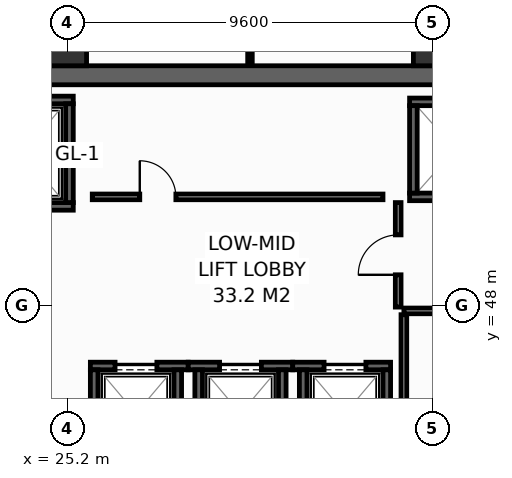
"""IFC4 building model, lengths in metres.
Left out: names, types, materials, properties, quantities, classifications, styles, units other than length and angle.
Written with IfcOpenShell. Run it as: python <this file> out.ifc"""

import sys

from ifc_helpers import new_model, si_unit, direction, frame, frame_2d, origin, origin_2d, place, context, subcontext, project, spatial, rectangle, hollow_rectangle, extrude, element, fill, save


model = new_model("IFC4")
c1 = context("Model", 3, precision=1e-05, world=origin(), true_north=direction((0.0, 1.0)))
c2 = subcontext(c1, "Body", "Model", "MODEL_VIEW")
j1 = project(units=[si_unit("LENGTHUNIT", "METRE"), si_unit("PLANEANGLEUNIT", "RADIAN")], contexts=[c1])
p1 = place(None, origin())
s1 = spatial("IfcSite", under=j1, at=p1, CompositionType="ELEMENT")
p2 = place(p1, origin())
s2 = spatial("IfcBuilding", under=s1, at=p2, CompositionType="ELEMENT")
p3 = place(p2, frame((0.0, 0.0, 156.2)))
s3 = spatial("IfcBuildingStorey", under=s2, at=p3, CompositionType="ELEMENT", Elevation=156.2)
p4 = place(p3, frame((13.6, 54.05, 0.0), z_axis=(0.0, 0.0, 1.0), x_axis=(1.0, 0.0, 0.0)))
e1 = element("IfcWall", 1, at=p4, inside=s3, PredefinedType="SHEAR", context=c2, shape_type="SweptSolid", body=[
    extrude(rectangle(XDim=32.7, YDim=0.5, at=frame_2d((16.35, 0.0))), origin(), (0.0, 0.0, 1.0), 3.55),
])
for number, where, z_axis, x_axis in (
    (2, (25.2, 54.8, 0.0), (0.0, 0.0, 1.0), (1.0, 0.0, 0.0)),
    (3, (34.8, 54.8, 0.0), (0.0, 0.0, 1.0), (1.0, 0.0, 0.0)),
):
    element("IfcColumn", number, at=place(p3, frame(where, z_axis=z_axis, x_axis=x_axis)), inside=s3, PredefinedType="COLUMN", context=c2, shape_type="SweptSolid", body=[
        extrude(hollow_rectangle(XDim=1.0, YDim=1.0, WallThickness=0.045, at=origin_2d()), origin(), (0.0, 0.0, 1.0), 3.8),
    ])
p5 = place(p3, frame((22.5, 50.6, 0.0), z_axis=(0.0, 0.0, 1.0), x_axis=(1.0, 0.0, 0.0)))
e4 = element("IfcWall", 4, at=p5, inside=s3, PredefinedType="SHEAR", context=c2, shape_type="SweptSolid", body=[
    extrude(rectangle(XDim=2.85, YDim=0.2, at=frame_2d((1.425, 0.0))), origin(), (0.0, 0.0, 1.0), 3.55),
])
p6 = place(p5, frame((0.925, 0.0, 0.0)))
e5 = element("IfcOpeningElement", 5, at=p6, cuts=e4, PredefinedType="OPENING", context=c2, shape_type="SweptSolid", body=[
    extrude(rectangle(XDim=1.25, YDim=2.3, at=frame_2d((0.625, 1.15))), frame((0.0, 0.11, 0.0), z_axis=(0.0, -1.0, 0.0), x_axis=(1.0, 0.0, 0.0)), (0.0, 0.0, 1.0), 0.22),
])
p7 = place(p3, frame((22.5, 53.4, 0.0), z_axis=(0.0, 0.0, 1.0), x_axis=(1.0, 0.0, 0.0)))
e6 = element("IfcWall", 6, at=p7, inside=s3, PredefinedType="SHEAR", context=c2, shape_type="SweptSolid", body=[
    extrude(rectangle(XDim=2.85, YDim=0.2, at=frame_2d((1.425, 0.0))), origin(), (0.0, 0.0, 1.0), 3.55),
])
p8 = place(p3, frame((25.25, 50.7, 0.0), z_axis=(0.0, 0.0, 1.0), x_axis=(0.0, 1.0, 0.0)))
e7 = element("IfcWall", 7, at=p8, inside=s3, PredefinedType="SHEAR", context=c2, shape_type="SweptSolid", body=[
    extrude(rectangle(XDim=2.6, YDim=0.2, at=frame_2d((1.3, 0.0))), origin(), (0.0, 0.0, 1.0), 3.55),
])
p9 = place(p3, frame((25.8, 46.4, 0.0), z_axis=(0.0, 0.0, 1.0), x_axis=(1.0, 0.0, 0.0)))
e8 = element("IfcWall", 8, at=p9, inside=s3, PredefinedType="SHEAR", context=c2, shape_type="SweptSolid", body=[
    extrude(rectangle(XDim=2.575, YDim=0.2, at=frame_2d((1.288, 0.0))), origin(), (0.0, 0.0, 1.0), 3.55),
])
p10 = place(p9, frame((0.65, 0.0, 0.0)))
e9 = element("IfcOpeningElement", 9, at=p10, cuts=e8, PredefinedType="OPENING", context=c2, shape_type="SweptSolid", body=[
    extrude(rectangle(XDim=1.1, YDim=2.2, at=frame_2d((0.55, 1.1))), frame((0.0, 0.11, 0.0), z_axis=(0.0, -1.0, 0.0), x_axis=(1.0, 0.0, 0.0)), (0.0, 0.0, 1.0), 0.22),
])
for number, where, z_axis, x_axis in (
    (10, (25.9, 44.0, 0.0), (0.0, 0.0, 1.0), (0.0, 1.0, 0.0)),
    (11, (28.1, 44.0, 0.0), (0.0, 0.0, 1.0), (0.0, 1.0, 0.0)),
):
    element("IfcWall", number, at=place(p3, frame(where, z_axis=z_axis, x_axis=x_axis)), inside=s3, PredefinedType="SHEAR", context=c2, shape_type="SweptSolid", body=[
        extrude(rectangle(XDim=2.3, YDim=0.2, at=frame_2d((1.15, 0.0))), origin(), (0.0, 0.0, 1.0), 3.55),
    ])
p11 = place(p3, frame((28.375, 46.4, 0.0), z_axis=(0.0, 0.0, 1.0), x_axis=(1.0, 0.0, 0.0)))
e12 = element("IfcWall", 12, at=p11, inside=s3, PredefinedType="SHEAR", context=c2, shape_type="SweptSolid", body=[
    extrude(rectangle(XDim=2.75, YDim=0.2, at=frame_2d((1.375, 0.0))), origin(), (0.0, 0.0, 1.0), 3.55),
])
p12 = place(p11, frame((0.825, 0.0, 0.0)))
e13 = element("IfcOpeningElement", 13, at=p12, cuts=e12, PredefinedType="OPENING", context=c2, shape_type="SweptSolid", body=[
    extrude(rectangle(XDim=1.1, YDim=2.2, at=frame_2d((0.55, 1.1))), frame((0.0, 0.11, 0.0), z_axis=(0.0, -1.0, 0.0), x_axis=(1.0, 0.0, 0.0)), (0.0, 0.0, 1.0), 0.22),
])
for number, where, z_axis, x_axis in (
    (14, (28.65, 44.0, 0.0), (0.0, 0.0, 1.0), (0.0, 1.0, 0.0)),
    (15, (30.85, 44.0, 0.0), (0.0, 0.0, 1.0), (0.0, 1.0, 0.0)),
):
    element("IfcWall", number, at=place(p3, frame(where, z_axis=z_axis, x_axis=x_axis)), inside=s3, PredefinedType="SHEAR", context=c2, shape_type="SweptSolid", body=[
        extrude(rectangle(XDim=2.3, YDim=0.2, at=frame_2d((1.15, 0.0))), origin(), (0.0, 0.0, 1.0), 3.55),
    ])
p13 = place(p3, frame((31.125, 46.4, 0.0), z_axis=(0.0, 0.0, 1.0), x_axis=(1.0, 0.0, 0.0)))
e16 = element("IfcWall", 16, at=p13, inside=s3, PredefinedType="SHEAR", context=c2, shape_type="SweptSolid", body=[
    extrude(rectangle(XDim=2.575, YDim=0.2, at=frame_2d((1.288, 0.0))), origin(), (0.0, 0.0, 1.0), 3.55),
])
p14 = place(p13, frame((0.825, 0.0, 0.0)))
e17 = element("IfcOpeningElement", 17, at=p14, cuts=e16, PredefinedType="OPENING", context=c2, shape_type="SweptSolid", body=[
    extrude(rectangle(XDim=1.1, YDim=2.2, at=frame_2d((0.55, 1.1))), frame((0.0, 0.11, 0.0), z_axis=(0.0, -1.0, 0.0), x_axis=(1.0, 0.0, 0.0)), (0.0, 0.0, 1.0), 0.22),
])
for number, where, z_axis, x_axis in (
    (18, (31.4, 44.0, 0.0), (0.0, 0.0, 1.0), (0.0, 1.0, 0.0)),
    (19, (33.6, 44.0, 0.0), (0.0, 0.0, 1.0), (0.0, 1.0, 0.0)),
):
    element("IfcWall", number, at=place(p3, frame(where, z_axis=z_axis, x_axis=x_axis)), inside=s3, PredefinedType="SHEAR", context=c2, shape_type="SweptSolid", body=[
        extrude(rectangle(XDim=2.3, YDim=0.2, at=frame_2d((1.15, 0.0))), origin(), (0.0, 0.0, 1.0), 3.55),
    ])
for number, where, z_axis, x_axis in (
    (20, (34.2, 50.85, 0.0), (0.0, 0.0, 1.0), (1.0, 0.0, 0.0)),
    (21, (34.2, 53.35, 0.0), (0.0, 0.0, 1.0), (1.0, 0.0, 0.0)),
):
    element("IfcWall", number, at=place(p3, frame(where, z_axis=z_axis, x_axis=x_axis)), inside=s3, PredefinedType="SHEAR", context=c2, shape_type="SweptSolid", body=[
        extrude(rectangle(XDim=2.575, YDim=0.2, at=frame_2d((1.288, 0.0))), origin(), (0.0, 0.0, 1.0), 3.55),
    ])
p15 = place(p3, frame((34.3, 50.95, 0.0), z_axis=(0.0, 0.0, 1.0), x_axis=(0.0, 1.0, 0.0)))
e22 = element("IfcWall", 22, at=p15, inside=s3, PredefinedType="SHEAR", context=c2, shape_type="SweptSolid", body=[
    extrude(rectangle(XDim=2.3, YDim=0.2, at=frame_2d((1.15, 0.0))), origin(), (0.0, 0.0, 1.0), 3.55),
])
p16 = place(p3, frame((33.9, 47.95, 0.0), z_axis=(0.0, 0.0, 1.0), x_axis=(0.0, 1.0, 0.0)))
e23 = element("IfcWall", 23, at=p16, inside=s3, PredefinedType="PARTITIONING", context=c2, shape_type="SweptSolid", body=[
    extrude(rectangle(XDim=2.75, YDim=0.15, at=frame_2d((1.375, 0.0))), origin(), (0.0, 0.0, 1.0), 3.55),
])
p17 = place(p16, frame((0.85, 0.0, 0.0)))
e24 = element("IfcOpeningElement", 24, at=p17, cuts=e23, PredefinedType="OPENING", context=c2, shape_type="SweptSolid", body=[
    extrude(rectangle(XDim=1.05, YDim=2.15, at=frame_2d((0.525, 1.075))), frame((0.0, 0.085, 0.0), z_axis=(0.0, -1.0, 0.0), x_axis=(1.0, 0.0, 0.0)), (0.0, 0.0, 1.0), 0.17),
])
p18 = place(p3, frame((34.05, 47.85, 0.0), z_axis=(0.0, 0.0, 1.0), x_axis=(1.0, 0.0, 0.0)))
e25 = element("IfcWall", 25, at=p18, inside=s3, PredefinedType="PARTITIONING", context=c2, shape_type="SweptSolid", body=[
    extrude(rectangle(XDim=8.45, YDim=0.15, at=frame_2d((4.225, 0.0))), origin(), (0.0, 0.0, 1.0), 3.55),
])
p19 = place(p3, frame((34.05, 45.22, 0.0), z_axis=(0.0, 0.0, 1.0), x_axis=(0.0, 1.0, 0.0)))
e26 = element("IfcWall", 26, at=p19, inside=s3, PredefinedType="PARTITIONING", context=c2, shape_type="SweptSolid", body=[
    extrude(rectangle(XDim=2.53, YDim=0.15, at=frame_2d((1.265, 0.0))), origin(), (0.0, 0.0, 1.0), 3.55),
])
p20 = place(p3, frame((25.85, 50.85, 0.0), z_axis=(0.0, 0.0, 1.0), x_axis=(1.0, 0.0, 0.0)))
e27 = element("IfcWall", 27, at=p20, inside=s3, PredefinedType="PARTITIONING", context=c2, shape_type="SweptSolid", body=[
    extrude(rectangle(XDim=7.65, YDim=0.15, at=frame_2d((3.825, 0.0))), origin(), (0.0, 0.0, 1.0), 3.55),
])
p21 = place(p20, frame((1.25, 0.0, 0.0)))
e28 = element("IfcOpeningElement", 28, at=p21, cuts=e27, PredefinedType="OPENING", context=c2, shape_type="SweptSolid", body=[
    extrude(rectangle(XDim=0.95, YDim=2.15, at=frame_2d((0.475, 1.075))), frame((0.0, 0.085, 0.0), z_axis=(0.0, -1.0, 0.0), x_axis=(1.0, 0.0, 0.0)), (0.0, 0.0, 1.0), 0.17),
])
p22 = place(p3, frame((30.0, 54.32, 0.0), z_axis=(0.0, 0.0, 1.0), x_axis=(0.0, 1.0, 0.0)))
e29 = element("IfcWall", 29, at=p22, inside=s3, PredefinedType="PARTITIONING", context=c2, shape_type="SweptSolid", body=[
    extrude(rectangle(XDim=1.675, YDim=0.12, at=frame_2d((0.837, 0.0))), origin(), (0.0, 0.0, 1.0), 2.935),
])
p23 = place(p10, origin())
e30 = element("IfcDoor", 30, at=p23, inside=s3, OperationType="SLIDING_TO_LEFT", PredefinedType="DOOR", context=c2, shape_type="SweptSolid", body=[
    extrude(rectangle(XDim=1.1, YDim=2.2, at=frame_2d((0.55, 1.1))), frame((0.0, 0.025, 0.0), z_axis=(0.0, -1.0, 0.0), x_axis=(1.0, 0.0, 0.0)), (0.0, 0.0, 1.0), 0.05),
])
fill(e9, e30)
p24 = place(p12, origin())
e31 = element("IfcDoor", 31, at=p24, inside=s3, OperationType="SLIDING_TO_LEFT", PredefinedType="DOOR", context=c2, shape_type="SweptSolid", body=[
    extrude(rectangle(XDim=1.1, YDim=2.2, at=frame_2d((0.55, 1.1))), frame((0.0, 0.025, 0.0), z_axis=(0.0, -1.0, 0.0), x_axis=(1.0, 0.0, 0.0)), (0.0, 0.0, 1.0), 0.05),
])
fill(e13, e31)
p25 = place(p14, origin())
e32 = element("IfcDoor", 32, at=p25, inside=s3, OperationType="SLIDING_TO_LEFT", PredefinedType="DOOR", context=c2, shape_type="SweptSolid", body=[
    extrude(rectangle(XDim=1.1, YDim=2.2, at=frame_2d((0.55, 1.1))), frame((0.0, 0.025, 0.0), z_axis=(0.0, -1.0, 0.0), x_axis=(1.0, 0.0, 0.0)), (0.0, 0.0, 1.0), 0.05),
])
fill(e17, e32)
p26 = place(p17, origin())
e33 = element("IfcDoor", 33, at=p26, inside=s3, OperationType="SINGLE_SWING_LEFT", PredefinedType="DOOR", context=c2, shape_type="SweptSolid", body=[
    extrude(rectangle(XDim=1.05, YDim=2.15, at=frame_2d((0.525, 1.075))), frame((0.0, 0.025, 0.0), z_axis=(0.0, -1.0, 0.0), x_axis=(1.0, 0.0, 0.0)), (0.0, 0.0, 1.0), 0.05),
])
fill(e24, e33)
p27 = place(p21, origin())
e34 = element("IfcDoor", 34, at=p27, inside=s3, OperationType="SINGLE_SWING_LEFT", PredefinedType="DOOR", context=c2, shape_type="SweptSolid", body=[
    extrude(rectangle(XDim=0.95, YDim=2.15, at=frame_2d((0.475, 1.075))), frame((0.0, 0.025, 0.0), z_axis=(0.0, -1.0, 0.0), x_axis=(1.0, 0.0, 0.0)), (0.0, 0.0, 1.0), 0.05),
])
fill(e28, e34)
save(model, sys.argv[1])
